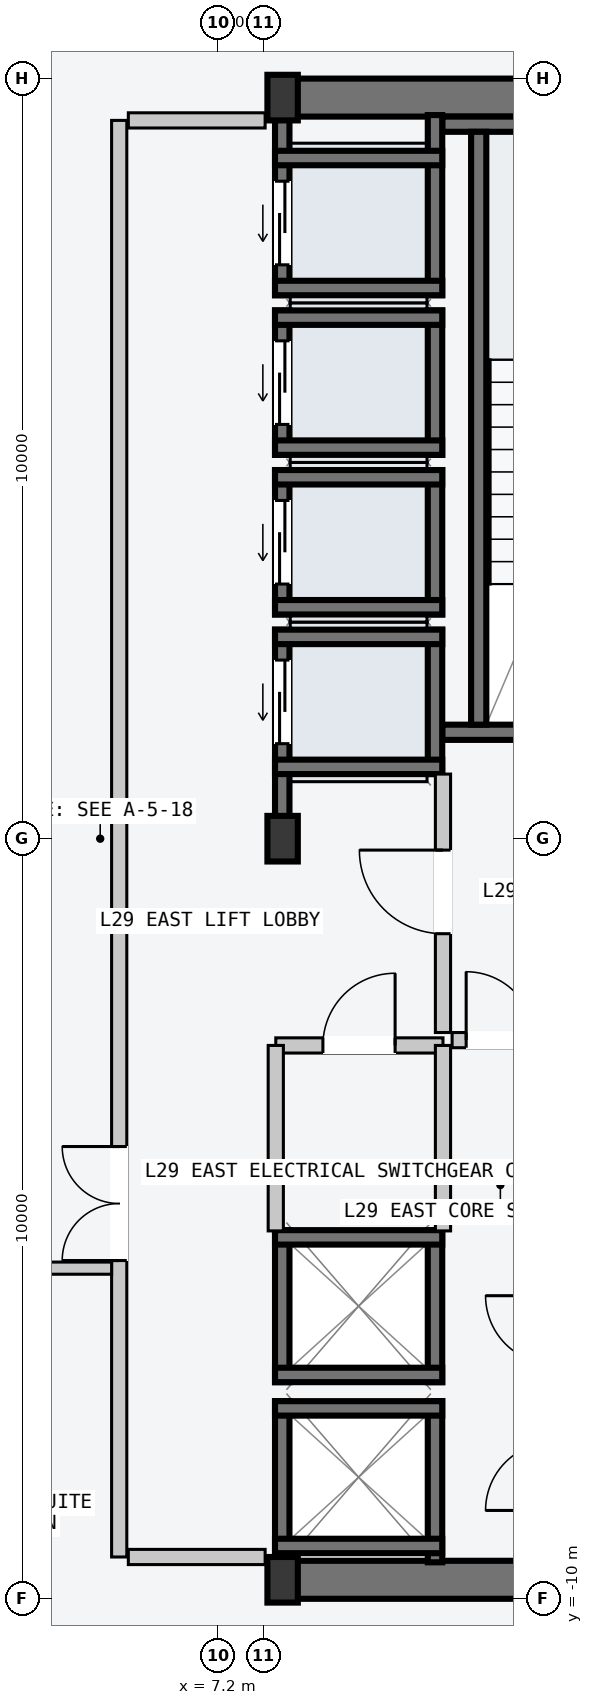
"""IFC4 building model, lengths in metres.
Left out: names, types, materials, properties, quantities, classifications, styles, units other than length and angle.
Written with IfcOpenShell. Run it as: python <this file> out.ifc"""

import sys

from ifc_helpers import new_model, si_unit, direction, frame, frame_2d, origin, origin_2d, place, context, subcontext, project, spatial, rectangle, i_section, extrude, element, fill, save


model = new_model("IFC4")
c1 = context("Model", 3, precision=1e-05, world=origin(), true_north=direction((0.0, 1.0)))
c2 = subcontext(c1, "Body", "Model", "MODEL_VIEW")
j1 = project(units=[si_unit("LENGTHUNIT", "METRE"), si_unit("PLANEANGLEUNIT", "RADIAN")], contexts=[c1])
p1 = place(None, origin())
s1 = spatial("IfcSite", under=j1, at=p1, CompositionType="ELEMENT")
p2 = place(p1, origin())
s2 = spatial("IfcBuilding", under=s1, at=p2, CompositionType="ELEMENT")
p3 = place(p2, frame((0.0, 0.0, 113.4)))
s3 = spatial("IfcBuildingStorey", under=s2, at=p3, CompositionType="ELEMENT", Elevation=113.4)
for number, where, z_axis, x_axis in (
    (1, (8.07, -9.75, -0.2), (0.0, 0.0, 1.0), (1.0, 0.0, 0.0)),
    (2, (8.07, 9.75, -0.2), (0.0, 0.0, 1.0), (1.0, 0.0, 0.0)),
):
    element("IfcWall", number, at=place(p3, frame(where, z_axis=z_axis, x_axis=x_axis)), inside=s3, PredefinedType="SHEAR", context=c2, shape_type="SweptSolid", body=[
        extrude(rectangle(XDim=6.46, YDim=0.5, at=frame_2d((3.23, 0.0))), origin(), (0.0, 0.0, 1.0), 3.6),
    ])
p4 = place(p3, frame((10.15, 1.4, -0.2), z_axis=(0.0, 0.0, 1.0), x_axis=(1.0, 0.0, 0.0)))
e3 = element("IfcWall", 3, at=p4, inside=s3, PredefinedType="SOLIDWALL", context=c2, shape_type="SweptSolid", body=[
    extrude(rectangle(XDim=4.1, YDim=0.2, at=frame_2d((2.05, 0.0))), origin(), (0.0, 0.0, 1.0), 3.6),
])
p5 = place(p4, frame((1.5, 0.0, 0.2)))
e4 = element("IfcOpeningElement", 4, at=p5, cuts=e3, PredefinedType="OPENING", context=c2, shape_type="SweptSolid", body=[
    extrude(rectangle(XDim=1.12, YDim=2.18, at=frame_2d((0.56, 1.09))), frame((0.0, 0.11, 0.0), z_axis=(0.0, -1.0, 0.0), x_axis=(1.0, 0.0, 0.0)), (0.0, 0.0, 1.0), 0.22),
])
p6 = place(p3, frame((10.15, 9.4, -0.2), z_axis=(0.0, 0.0, 1.0), x_axis=(1.0, 0.0, 0.0)))
e5 = element("IfcWall", 5, at=p6, inside=s3, PredefinedType="SOLIDWALL", context=c2, shape_type="SweptSolid", body=[
    extrude(rectangle(XDim=4.1, YDim=0.2, at=frame_2d((2.05, 0.0))), origin(), (0.0, 0.0, 1.0), 3.6),
])
p7 = place(p3, frame((10.63, 1.5, -0.2), z_axis=(0.0, 0.0, 1.0), x_axis=(0.0, 1.0, 0.0)))
e6 = element("IfcWall", 6, at=p7, inside=s3, PredefinedType="SOLIDWALL", context=c2, shape_type="SweptSolid", body=[
    extrude(rectangle(XDim=7.8, YDim=0.2, at=frame_2d((3.9, 0.0))), origin(), (0.0, 0.0, 1.0), 3.6),
])
for number, where, z_axis, x_axis in (
    (7, (8.05, -9.75, 0.0), (0.0, 0.0, 1.0), (1.0, 0.0, 0.0)),
    (8, (8.05, 0.0, 0.0), (0.0, 0.0, 1.0), (1.0, 0.0, 0.0)),
    (9, (8.05, 9.75, 0.0), (0.0, 0.0, 1.0), (1.0, 0.0, 0.0)),
):
    element("IfcColumn", number, at=place(p3, frame(where, z_axis=z_axis, x_axis=x_axis)), inside=s3, PredefinedType="COLUMN", context=c2, shape_type="SweptSolid", body=[
        extrude(i_section(OverallWidth=0.4, OverallDepth=0.6, WebThickness=0.022, FlangeThickness=0.036, at=origin_2d()), origin(), (0.0, 0.0, 1.0), 3.6),
    ])
p8 = place(p3, frame((8.045, 0.21, -0.2), z_axis=(0.0, 0.0, 1.0), x_axis=(0.0, 1.0, 0.0)))
e10 = element("IfcWall", 10, at=p8, inside=s3, PredefinedType="SOLIDWALL", context=c2, shape_type="SweptSolid", body=[
    extrude(rectangle(XDim=2.54, YDim=0.19, at=frame_2d((1.27, 0.0))), origin(), (0.0, 0.0, 1.0), 3.6),
])
p9 = place(p8, frame((1.04, 0.0, 0.2)))
e11 = element("IfcOpeningElement", 11, at=p9, cuts=e10, PredefinedType="OPENING", context=c2, shape_type="SweptSolid", body=[
    extrude(rectangle(XDim=1.1, YDim=2.2, at=frame_2d((0.55, 1.1))), frame((0.0, 0.105, 0.0), z_axis=(0.0, -1.0, 0.0), x_axis=(1.0, 0.0, 0.0)), (0.0, 0.0, 1.0), 0.21),
])
p10 = place(p3, frame((10.055, 0.85, -0.2), z_axis=(0.0, 0.0, 1.0), x_axis=(0.0, 1.0, 0.0)))
e12 = element("IfcWall", 12, at=p10, inside=s3, PredefinedType="SOLIDWALL", context=c2, shape_type="SweptSolid", body=[
    extrude(rectangle(XDim=1.9, YDim=0.19, at=frame_2d((0.95, 0.0))), origin(), (0.0, 0.0, 1.0), 3.6),
])
for number, where, z_axis, x_axis in (
    (13, (7.95, 2.655, -0.2), (0.0, 0.0, 1.0), (1.0, 0.0, 0.0)),
    (14, (7.95, 0.945, -0.2), (0.0, 0.0, 1.0), (1.0, 0.0, 0.0)),
):
    element("IfcWall", number, at=place(p3, frame(where, z_axis=z_axis, x_axis=x_axis)), inside=s3, PredefinedType="SOLIDWALL", context=c2, shape_type="SweptSolid", body=[
        extrude(rectangle(XDim=2.2, YDim=0.19, at=frame_2d((1.1, 0.0))), origin(), (0.0, 0.0, 1.0), 3.6),
    ])
p11 = place(p3, frame((8.045, 2.95, -0.2), z_axis=(0.0, 0.0, 1.0), x_axis=(0.0, 1.0, 0.0)))
e15 = element("IfcWall", 15, at=p11, inside=s3, PredefinedType="SOLIDWALL", context=c2, shape_type="SweptSolid", body=[
    extrude(rectangle(XDim=1.9, YDim=0.19, at=frame_2d((0.95, 0.0))), origin(), (0.0, 0.0, 1.0), 3.6),
])
p12 = place(p11, frame((0.4, 0.0, 0.2)))
e16 = element("IfcOpeningElement", 16, at=p12, cuts=e15, PredefinedType="OPENING", context=c2, shape_type="SweptSolid", body=[
    extrude(rectangle(XDim=1.1, YDim=2.2, at=frame_2d((0.55, 1.1))), frame((0.0, 0.105, 0.0), z_axis=(0.0, -1.0, 0.0), x_axis=(1.0, 0.0, 0.0)), (0.0, 0.0, 1.0), 0.21),
])
p13 = place(p3, frame((10.055, 2.95, -0.2), z_axis=(0.0, 0.0, 1.0), x_axis=(0.0, 1.0, 0.0)))
e17 = element("IfcWall", 17, at=p13, inside=s3, PredefinedType="SOLIDWALL", context=c2, shape_type="SweptSolid", body=[
    extrude(rectangle(XDim=1.9, YDim=0.19, at=frame_2d((0.95, 0.0))), origin(), (0.0, 0.0, 1.0), 3.6),
])
for number, where, z_axis, x_axis in (
    (18, (7.95, 4.755, -0.2), (0.0, 0.0, 1.0), (1.0, 0.0, 0.0)),
    (19, (7.95, 3.045, -0.2), (0.0, 0.0, 1.0), (1.0, 0.0, 0.0)),
):
    element("IfcWall", number, at=place(p3, frame(where, z_axis=z_axis, x_axis=x_axis)), inside=s3, PredefinedType="SOLIDWALL", context=c2, shape_type="SweptSolid", body=[
        extrude(rectangle(XDim=2.2, YDim=0.19, at=frame_2d((1.1, 0.0))), origin(), (0.0, 0.0, 1.0), 3.6),
    ])
p14 = place(p3, frame((8.045, 5.05, -0.2), z_axis=(0.0, 0.0, 1.0), x_axis=(0.0, 1.0, 0.0)))
e20 = element("IfcWall", 20, at=p14, inside=s3, PredefinedType="SOLIDWALL", context=c2, shape_type="SweptSolid", body=[
    extrude(rectangle(XDim=1.9, YDim=0.19, at=frame_2d((0.95, 0.0))), origin(), (0.0, 0.0, 1.0), 3.6),
])
p15 = place(p14, frame((0.4, 0.0, 0.2)))
e21 = element("IfcOpeningElement", 21, at=p15, cuts=e20, PredefinedType="OPENING", context=c2, shape_type="SweptSolid", body=[
    extrude(rectangle(XDim=1.1, YDim=2.2, at=frame_2d((0.55, 1.1))), frame((0.0, 0.105, 0.0), z_axis=(0.0, -1.0, 0.0), x_axis=(1.0, 0.0, 0.0)), (0.0, 0.0, 1.0), 0.21),
])
p16 = place(p3, frame((10.055, 5.05, -0.2), z_axis=(0.0, 0.0, 1.0), x_axis=(0.0, 1.0, 0.0)))
e22 = element("IfcWall", 22, at=p16, inside=s3, PredefinedType="SOLIDWALL", context=c2, shape_type="SweptSolid", body=[
    extrude(rectangle(XDim=1.9, YDim=0.19, at=frame_2d((0.95, 0.0))), origin(), (0.0, 0.0, 1.0), 3.6),
])
for number, where, z_axis, x_axis in (
    (23, (7.95, 6.855, -0.2), (0.0, 0.0, 1.0), (1.0, 0.0, 0.0)),
    (24, (7.95, 5.145, -0.2), (0.0, 0.0, 1.0), (1.0, 0.0, 0.0)),
):
    element("IfcWall", number, at=place(p3, frame(where, z_axis=z_axis, x_axis=x_axis)), inside=s3, PredefinedType="SOLIDWALL", context=c2, shape_type="SweptSolid", body=[
        extrude(rectangle(XDim=2.2, YDim=0.19, at=frame_2d((1.1, 0.0))), origin(), (0.0, 0.0, 1.0), 3.6),
    ])
p17 = place(p3, frame((8.045, 7.15, -0.2), z_axis=(0.0, 0.0, 1.0), x_axis=(0.0, 1.0, 0.0)))
e25 = element("IfcWall", 25, at=p17, inside=s3, PredefinedType="SOLIDWALL", context=c2, shape_type="SweptSolid", body=[
    extrude(rectangle(XDim=2.37, YDim=0.19, at=frame_2d((1.185, 0.0))), origin(), (0.0, 0.0, 1.0), 3.6),
])
p18 = place(p17, frame((0.4, 0.0, 0.2)))
e26 = element("IfcOpeningElement", 26, at=p18, cuts=e25, PredefinedType="OPENING", context=c2, shape_type="SweptSolid", body=[
    extrude(rectangle(XDim=1.1, YDim=2.2, at=frame_2d((0.55, 1.1))), frame((0.0, 0.105, 0.0), z_axis=(0.0, -1.0, 0.0), x_axis=(1.0, 0.0, 0.0)), (0.0, 0.0, 1.0), 0.21),
])
p19 = place(p3, frame((10.055, 7.15, -0.2), z_axis=(0.0, 0.0, 1.0), x_axis=(0.0, 1.0, 0.0)))
e27 = element("IfcWall", 27, at=p19, inside=s3, PredefinedType="SOLIDWALL", context=c2, shape_type="SweptSolid", body=[
    extrude(rectangle(XDim=2.37, YDim=0.19, at=frame_2d((1.185, 0.0))), origin(), (0.0, 0.0, 1.0), 3.6),
])
for number, where, z_axis, x_axis in (
    (28, (7.95, 8.955, -0.2), (0.0, 0.0, 1.0), (1.0, 0.0, 0.0)),
    (29, (7.95, 7.245, -0.2), (0.0, 0.0, 1.0), (1.0, 0.0, 0.0)),
):
    element("IfcWall", number, at=place(p3, frame(where, z_axis=z_axis, x_axis=x_axis)), inside=s3, PredefinedType="SOLIDWALL", context=c2, shape_type="SweptSolid", body=[
        extrude(rectangle(XDim=2.2, YDim=0.19, at=frame_2d((1.1, 0.0))), origin(), (0.0, 0.0, 1.0), 3.6),
    ])
for number, where, z_axis, x_axis in (
    (30, (8.045, -9.52, -0.2), (0.0, 0.0, 1.0), (0.0, 1.0, 0.0)),
    (31, (10.055, -9.52, -0.2), (0.0, 0.0, 1.0), (0.0, 1.0, 0.0)),
):
    element("IfcWall", number, at=place(p3, frame(where, z_axis=z_axis, x_axis=x_axis)), inside=s3, PredefinedType="SOLIDWALL", context=c2, shape_type="SweptSolid", body=[
        extrude(rectangle(XDim=2.12, YDim=0.19, at=frame_2d((1.06, 0.0))), origin(), (0.0, 0.0, 1.0), 3.6),
    ])
for number, where, z_axis, x_axis in (
    (32, (7.95, -7.495, -0.2), (0.0, 0.0, 1.0), (1.0, 0.0, 0.0)),
    (33, (7.95, -9.305, -0.2), (0.0, 0.0, 1.0), (1.0, 0.0, 0.0)),
):
    element("IfcWall", number, at=place(p3, frame(where, z_axis=z_axis, x_axis=x_axis)), inside=s3, PredefinedType="SOLIDWALL", context=c2, shape_type="SweptSolid", body=[
        extrude(rectangle(XDim=2.2, YDim=0.19, at=frame_2d((1.1, 0.0))), origin(), (0.0, 0.0, 1.0), 3.6),
    ])
for number, where, z_axis, x_axis in (
    (34, (8.045, -7.15, -0.2), (0.0, 0.0, 1.0), (0.0, 1.0, 0.0)),
    (35, (10.055, -7.15, -0.2), (0.0, 0.0, 1.0), (0.0, 1.0, 0.0)),
):
    element("IfcWall", number, at=place(p3, frame(where, z_axis=z_axis, x_axis=x_axis)), inside=s3, PredefinedType="SOLIDWALL", context=c2, shape_type="SweptSolid", body=[
        extrude(rectangle(XDim=2.0, YDim=0.19, at=frame_2d((1.0, 0.0))), origin(), (0.0, 0.0, 1.0), 3.6),
    ])
for number, where, z_axis, x_axis in (
    (36, (7.95, -5.245, -0.2), (0.0, 0.0, 1.0), (1.0, 0.0, 0.0)),
    (37, (7.95, -7.055, -0.2), (0.0, 0.0, 1.0), (1.0, 0.0, 0.0)),
):
    element("IfcWall", number, at=place(p3, frame(where, z_axis=z_axis, x_axis=x_axis)), inside=s3, PredefinedType="SOLIDWALL", context=c2, shape_type="SweptSolid", body=[
        extrude(rectangle(XDim=2.2, YDim=0.19, at=frame_2d((1.1, 0.0))), origin(), (0.0, 0.0, 1.0), 3.6),
    ])
p20 = place(p3, frame((5.9, -9.45, 0.0), z_axis=(0.0, 0.0, 1.0), x_axis=(0.0, 1.0, 0.0)))
e38 = element("IfcWall", 38, at=p20, inside=s3, PredefinedType="PARTITIONING", context=c2, shape_type="SweptSolid", body=[
    extrude(rectangle(XDim=18.9, YDim=0.2, at=frame_2d((9.45, 0.0))), origin(), (0.0, 0.0, 1.0), 3.4),
])
p21 = place(p20, frame((3.9, 0.0, 0.0)))
e39 = element("IfcOpeningElement", 39, at=p21, cuts=e38, PredefinedType="OPENING", context=c2, shape_type="SweptSolid", body=[
    extrude(rectangle(XDim=1.5, YDim=2.2, at=frame_2d((0.75, 1.1))), frame((0.0, 0.11, 0.0), z_axis=(0.0, -1.0, 0.0), x_axis=(1.0, 0.0, 0.0)), (0.0, 0.0, 1.0), 0.22),
])
for number, where, z_axis, x_axis in (
    (40, (6.02, -9.45, 0.0), (0.0, 0.0, 1.0), (1.0, 0.0, 0.0)),
    (41, (6.02, 9.45, 0.0), (0.0, 0.0, 1.0), (1.0, 0.0, 0.0)),
):
    element("IfcWall", number, at=place(p3, frame(where, z_axis=z_axis, x_axis=x_axis)), inside=s3, PredefinedType="PARTITIONING", context=c2, shape_type="SweptSolid", body=[
        extrude(rectangle(XDim=1.8, YDim=0.2, at=frame_2d((0.9, 0.0))), origin(), (0.0, 0.0, 1.0), 3.4),
    ])
p22 = place(p3, frame((10.16, -2.55, 0.0), z_axis=(0.0, 0.0, 1.0), x_axis=(0.0, 1.0, 0.0)))
e42 = element("IfcWall", 42, at=p22, inside=s3, PredefinedType="PARTITIONING", context=c2, shape_type="SweptSolid", body=[
    extrude(rectangle(XDim=3.4, YDim=0.2, at=frame_2d((1.7, 0.0))), origin(), (0.0, 0.0, 1.0), 3.4),
])
p23 = place(p22, frame((1.3, 0.0, 0.0)))
e43 = element("IfcOpeningElement", 43, at=p23, cuts=e42, PredefinedType="OPENING", context=c2, shape_type="SweptSolid", body=[
    extrude(rectangle(XDim=1.1, YDim=2.15, at=frame_2d((0.55, 1.075))), frame((0.0, 0.11, 0.0), z_axis=(0.0, -1.0, 0.0), x_axis=(1.0, 0.0, 0.0)), (0.0, 0.0, 1.0), 0.22),
])
p24 = place(p3, frame((10.28, -2.65, 0.0), z_axis=(0.0, 0.0, 1.0), x_axis=(1.0, 0.0, 0.0)))
e44 = element("IfcWall", 44, at=p24, inside=s3, PredefinedType="PARTITIONING", context=c2, shape_type="SweptSolid", body=[
    extrude(rectangle(XDim=1.27, YDim=0.2, at=frame_2d((0.635, 0.0))), origin(), (0.0, 0.0, 1.0), 3.4),
])
p25 = place(p24, frame((0.185, 0.0, 0.0)))
e45 = element("IfcOpeningElement", 45, at=p25, cuts=e44, PredefinedType="OPENING", context=c2, shape_type="SweptSolid", body=[
    extrude(rectangle(XDim=0.9, YDim=2.15, at=frame_2d((0.45, 1.075))), frame((0.0, 0.11, 0.0), z_axis=(0.0, -1.0, 0.0), x_axis=(1.0, 0.0, 0.0)), (0.0, 0.0, 1.0), 0.22),
])
p26 = place(p3, frame((7.96, -2.72, 0.0), z_axis=(0.0, 0.0, 1.0), x_axis=(1.0, 0.0, 0.0)))
e46 = element("IfcWall", 46, at=p26, inside=s3, PredefinedType="PARTITIONING", context=c2, shape_type="SweptSolid", body=[
    extrude(rectangle(XDim=2.2, YDim=0.2, at=frame_2d((1.1, 0.0))), origin(), (0.0, 0.0, 1.0), 3.4),
])
p27 = place(p26, frame((0.62, 0.0, 0.0)))
e47 = element("IfcOpeningElement", 47, at=p27, cuts=e46, PredefinedType="OPENING", context=c2, shape_type="SweptSolid", body=[
    extrude(rectangle(XDim=0.95, YDim=2.1, at=frame_2d((0.475, 1.05))), frame((0.0, 0.11, 0.0), z_axis=(0.0, -1.0, 0.0), x_axis=(1.0, 0.0, 0.0)), (0.0, 0.0, 1.0), 0.22),
])
for number, where, z_axis, x_axis in (
    (48, (7.96, -5.16, 0.0), (0.0, 0.0, 1.0), (0.0, 1.0, 0.0)),
    (49, (10.16, -5.16, 0.0), (0.0, 0.0, 1.0), (0.0, 1.0, 0.0)),
):
    element("IfcWall", number, at=place(p3, frame(where, z_axis=z_axis, x_axis=x_axis)), inside=s3, PredefinedType="PARTITIONING", context=c2, shape_type="SweptSolid", body=[
        extrude(rectangle(XDim=2.44, YDim=0.2, at=frame_2d((1.22, 0.0))), origin(), (0.0, 0.0, 1.0), 3.4),
    ])
p28 = place(p3, frame((-5.8, -5.65, 0.0), z_axis=(0.0, 0.0, 1.0), x_axis=(1.0, 0.0, 0.0)))
e50 = element("IfcWall", 50, at=p28, inside=s3, PredefinedType="PARTITIONING", context=c2, shape_type="SweptSolid", body=[
    extrude(rectangle(XDim=11.6, YDim=0.16, at=frame_2d((5.8, 0.0))), origin(), (0.0, 0.0, 1.0), 3.4),
])
p29 = place(p28, frame((5.1, 0.0, 0.0)))
e51 = element("IfcOpeningElement", 51, at=p29, cuts=e50, PredefinedType="OPENING", context=c2, shape_type="SweptSolid", body=[
    extrude(rectangle(XDim=1.4, YDim=2.2, at=frame_2d((0.7, 1.1))), frame((0.0, 0.09, 0.0), z_axis=(0.0, -1.0, 0.0), x_axis=(1.0, 0.0, 0.0)), (0.0, 0.0, 1.0), 0.18),
])
p30 = place(p9, origin())
e52 = element("IfcDoor", 52, at=p30, inside=s3, OperationType="SLIDING_TO_LEFT", PredefinedType="DOOR", context=c2, shape_type="SweptSolid", body=[
    extrude(rectangle(XDim=1.1, YDim=2.2, at=frame_2d((0.55, 1.1))), frame((0.0, 0.025, 0.0), z_axis=(0.0, -1.0, 0.0), x_axis=(1.0, 0.0, 0.0)), (0.0, 0.0, 1.0), 0.05),
])
fill(e11, e52)
p31 = place(p12, origin())
e53 = element("IfcDoor", 53, at=p31, inside=s3, OperationType="SLIDING_TO_LEFT", PredefinedType="DOOR", context=c2, shape_type="SweptSolid", body=[
    extrude(rectangle(XDim=1.1, YDim=2.2, at=frame_2d((0.55, 1.1))), frame((0.0, 0.025, 0.0), z_axis=(0.0, -1.0, 0.0), x_axis=(1.0, 0.0, 0.0)), (0.0, 0.0, 1.0), 0.05),
])
fill(e16, e53)
p32 = place(p15, origin())
e54 = element("IfcDoor", 54, at=p32, inside=s3, OperationType="SLIDING_TO_LEFT", PredefinedType="DOOR", context=c2, shape_type="SweptSolid", body=[
    extrude(rectangle(XDim=1.1, YDim=2.2, at=frame_2d((0.55, 1.1))), frame((0.0, 0.025, 0.0), z_axis=(0.0, -1.0, 0.0), x_axis=(1.0, 0.0, 0.0)), (0.0, 0.0, 1.0), 0.05),
])
fill(e21, e54)
p33 = place(p18, origin())
e55 = element("IfcDoor", 55, at=p33, inside=s3, OperationType="SLIDING_TO_LEFT", PredefinedType="DOOR", context=c2, shape_type="SweptSolid", body=[
    extrude(rectangle(XDim=1.1, YDim=2.2, at=frame_2d((0.55, 1.1))), frame((0.0, 0.025, 0.0), z_axis=(0.0, -1.0, 0.0), x_axis=(1.0, 0.0, 0.0)), (0.0, 0.0, 1.0), 0.05),
])
fill(e26, e55)
p34 = place(p21, origin())
e56 = element("IfcDoor", 56, at=p34, inside=s3, OperationType="DOUBLE_DOOR_SINGLE_SWING", PredefinedType="DOOR", context=c2, shape_type="SweptSolid", body=[
    extrude(rectangle(XDim=1.5, YDim=2.2, at=frame_2d((0.75, 1.1))), frame((0.0, 0.025, 0.0), z_axis=(0.0, -1.0, 0.0), x_axis=(1.0, 0.0, 0.0)), (0.0, 0.0, 1.0), 0.05),
])
fill(e39, e56)
p35 = place(p23, origin())
e57 = element("IfcDoor", 57, at=p35, inside=s3, OperationType="SINGLE_SWING_RIGHT", PredefinedType="DOOR", context=c2, shape_type="SweptSolid", body=[
    extrude(rectangle(XDim=1.1, YDim=2.15, at=frame_2d((0.55, 1.075))), frame((0.0, 0.025, 0.0), z_axis=(0.0, -1.0, 0.0), x_axis=(1.0, 0.0, 0.0)), (0.0, 0.0, 1.0), 0.05),
])
fill(e43, e57)
p36 = place(p25, origin())
e58 = element("IfcDoor", 58, at=p36, inside=s3, OperationType="SINGLE_SWING_LEFT", PredefinedType="DOOR", context=c2, shape_type="SweptSolid", body=[
    extrude(rectangle(XDim=0.9, YDim=2.15, at=frame_2d((0.45, 1.075))), frame((0.0, 0.025, 0.0), z_axis=(0.0, -1.0, 0.0), x_axis=(1.0, 0.0, 0.0)), (0.0, 0.0, 1.0), 0.05),
])
fill(e45, e58)
p37 = place(p27, origin())
e59 = element("IfcDoor", 59, at=p37, inside=s3, OperationType="SINGLE_SWING_RIGHT", PredefinedType="DOOR", context=c2, shape_type="SweptSolid", body=[
    extrude(rectangle(XDim=0.95, YDim=2.1, at=frame_2d((0.475, 1.05))), frame((0.0, 0.025, 0.0), z_axis=(0.0, -1.0, 0.0), x_axis=(1.0, 0.0, 0.0)), (0.0, 0.0, 1.0), 0.05),
])
fill(e47, e59)
save(model, sys.argv[1])
